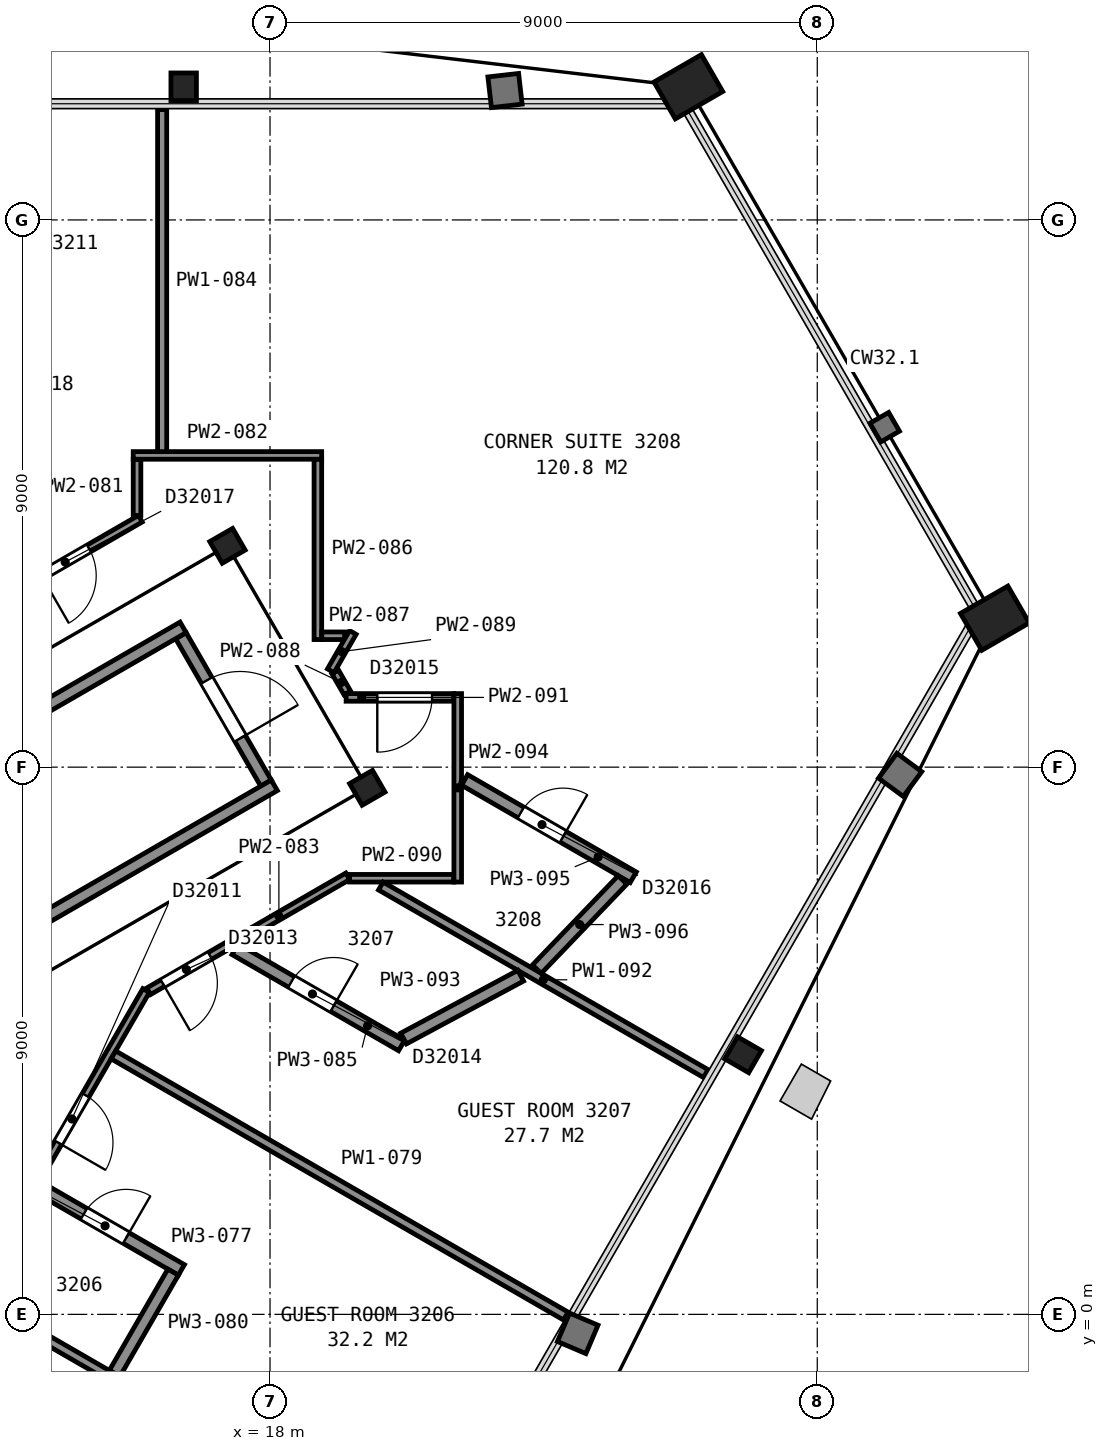
"""IFC4 building model, lengths in metres.
Left out: names, types, materials, properties, quantities, classifications, styles, units other than length and angle.
Written with IfcOpenShell. Run it as: python <this file> out.ifc"""

import sys

from ifc_helpers import new_model, si_unit, direction, frame, frame_2d, origin, origin_2d, place, context, subcontext, project, spatial, rectangle, hollow_rectangle, i_section, extrude, element, fill, save


model = new_model("IFC4")
c1 = context("Model", 3, precision=1e-05, world=origin(), true_north=direction((0.0, 1.0)))
c2 = subcontext(c1, "Body", "Model", "MODEL_VIEW")
j1 = project(units=[si_unit("LENGTHUNIT", "METRE"), si_unit("PLANEANGLEUNIT", "RADIAN")], contexts=[c1])
p1 = place(None, origin())
s1 = spatial("IfcSite", under=j1, at=p1, CompositionType="ELEMENT")
p2 = place(p1, origin())
s2 = spatial("IfcBuilding", under=s1, at=p2, CompositionType="ELEMENT")
p3 = place(p2, frame((0.0, 0.0, 132.4)))
s3 = spatial("IfcBuildingStorey", under=s2, at=p3, CompositionType="ELEMENT", Elevation=132.4)
p4 = place(p3, frame((24.88, 20.19, 0.075), z_axis=(0.0, 0.0, 1.0), x_axis=(0.5, -0.866025403784, 0.0)))
e1 = element("IfcColumn", 1, at=p4, inside=s3, PredefinedType="COLUMN", context=c2, shape_type="SweptSolid", body=[
    extrude(hollow_rectangle(XDim=0.7, YDim=0.9, WallThickness=0.065, at=origin_2d()), origin(), (0.0, 0.0, 1.0), 3.525),
])
for number, where, z_axis, x_axis in (
    (2, (16.58, 20.19, 0.04), (0.0, 0.0, 1.0), (1.0, 0.0, 0.0)),
    (3, (25.78, 4.27, 0.04), (0.0, 0.0, 1.0), (-0.5, -0.866, 0.0)),
):
    element("IfcColumn", number, at=place(p3, frame(where, z_axis=z_axis, x_axis=x_axis)), inside=s3, PredefinedType="COLUMN", context=c2, shape_type="SweptSolid", body=[
        extrude(i_section(OverallWidth=0.419, OverallDepth=0.455, WebThickness=0.042, FlangeThickness=0.068, FilletRadius=0.015, at=origin_2d()), origin(), (0.0, 0.0, 1.0), 3.56),
    ])
p5 = place(p3, frame((29.92, 11.45, 0.075), z_axis=(0.0, 0.0, 1.0), x_axis=(0.5, -0.866025403784, 0.0)))
e4 = element("IfcColumn", 4, at=p5, inside=s3, PredefinedType="COLUMN", context=c2, shape_type="SweptSolid", body=[
    extrude(hollow_rectangle(XDim=0.7, YDim=0.9, WallThickness=0.065, at=origin_2d()), origin(), (0.0, 0.0, 1.0), 3.525),
])
for number, where, z_axis, x_axis in (
    (5, (19.6, 8.66, 0.0), (0.0, 0.0, 1.0), (0.5, -0.866, 0.0)),
    (6, (17.3, 12.64, 0.0), (0.0, 0.0, 1.0), (0.5, -0.866, 0.0)),
):
    element("IfcColumn", number, at=place(p3, frame(where, z_axis=z_axis, x_axis=x_axis)), inside=s3, PredefinedType="COLUMN", context=c2, shape_type="SweptSolid", body=[
        extrude(i_section(OverallWidth=0.411, OverallDepth=0.434, WebThickness=0.036, FlangeThickness=0.057, FilletRadius=0.015, at=origin_2d()), origin(), (0.0, 0.0, 1.0), 3.6),
    ])
p6 = place(p3, frame((17.934, 8.738, 0.0), z_axis=(0.0, 0.0, 1.0), x_axis=(-0.49998411664, 0.866034573852, 0.0)))
e7 = element("IfcWall", 7, at=p6, inside=s3, PredefinedType="PARTITIONING", context=c2, shape_type="SweptSolid", body=[
    extrude(rectangle(XDim=2.8, YDim=0.2, at=frame_2d((1.4, 0.0))), origin(), (0.0, 0.0, 1.0), 3.35),
])
p7 = place(p6, frame((0.85, 0.0, 0.0)))
e8 = element("IfcOpeningElement", 8, at=p7, cuts=e7, PredefinedType="OPENING", context=c2, shape_type="SweptSolid", body=[
    extrude(rectangle(XDim=1.1, YDim=2.1, at=frame_2d((0.55, 1.05))), frame((0.0, 0.11, 0.0), z_axis=(0.0, -1.0, 0.0), x_axis=(1.0, 0.0, 0.0)), (0.0, 0.0, 1.0), 0.22),
])
for number, where, z_axis, x_axis in (
    (9, (6.178, 5.299, 0.0), (0.0, 0.0, 1.0), (0.866, 0.5, 0.0)),
    (10, (7.678, 2.701, 0.0), (0.0, 0.0, 1.0), (0.866, 0.5, 0.0)),
):
    element("IfcWall", number, at=place(p3, frame(where, z_axis=z_axis, x_axis=x_axis)), inside=s3, PredefinedType="PARTITIONING", context=c2, shape_type="SweptSolid", body=[
        extrude(rectangle(XDim=12.0, YDim=0.2, at=frame_2d((6.0, 0.0))), origin(), (0.0, 0.0, 1.0), 3.35),
    ])
p8 = place(p3, frame((15.962, 5.326, 0.0), z_axis=(0.0, 0.0, 1.0), x_axis=(-0.499992829944, -0.866029543379, 0.0)))
e11 = element("IfcWall", 11, at=p8, inside=s3, PredefinedType="PARTITIONING", context=c2, shape_type="SweptSolid", body=[
    extrude(rectangle(XDim=24.413, YDim=0.125, at=frame_2d((12.207, 0.0))), origin(), (0.0, 0.0, 1.0), 2.613),
])
p9 = place(p8, frame((21.258, 0.0, 0.0)))
e12 = element("IfcOpeningElement", 12, at=p9, cuts=e11, PredefinedType="OPENING", context=c2, shape_type="SweptSolid", body=[
    extrude(rectangle(XDim=0.9, YDim=2.1, at=frame_2d((0.45, 1.05))), frame((0.0, 0.073, 0.0), z_axis=(0.0, -1.0, 0.0), x_axis=(1.0, 0.0, 0.0)), (0.0, 0.0, 1.0), 0.145),
])
p10 = place(p8, frame((18.502, 0.0, 0.0)))
e13 = element("IfcOpeningElement", 13, at=p10, cuts=e11, PredefinedType="OPENING", context=c2, shape_type="SweptSolid", body=[
    extrude(rectangle(XDim=0.9, YDim=2.1, at=frame_2d((0.45, 1.05))), frame((0.0, 0.073, 0.0), z_axis=(0.0, -1.0, 0.0), x_axis=(1.0, 0.0, 0.0)), (0.0, 0.0, 1.0), 0.145),
])
p11 = place(p8, frame((11.799, 0.0, 0.0)))
e14 = element("IfcOpeningElement", 14, at=p11, cuts=e11, PredefinedType="OPENING", context=c2, shape_type="SweptSolid", body=[
    extrude(rectangle(XDim=0.9, YDim=2.1, at=frame_2d((0.45, 1.05))), frame((0.0, 0.073, 0.0), z_axis=(0.0, -1.0, 0.0), x_axis=(1.0, 0.0, 0.0)), (0.0, 0.0, 1.0), 0.145),
])
p12 = place(p8, frame((9.043, 0.0, 0.0)))
e15 = element("IfcOpeningElement", 15, at=p12, cuts=e11, PredefinedType="OPENING", context=c2, shape_type="SweptSolid", body=[
    extrude(rectangle(XDim=0.9, YDim=2.1, at=frame_2d((0.45, 1.05))), frame((0.0, 0.073, 0.0), z_axis=(0.0, -1.0, 0.0), x_axis=(1.0, 0.0, 0.0)), (0.0, 0.0, 1.0), 0.145),
])
p13 = place(p8, frame((1.99, 0.0, 0.0)))
e16 = element("IfcOpeningElement", 16, at=p13, cuts=e11, PredefinedType="OPENING", context=c2, shape_type="SweptSolid", body=[
    extrude(rectangle(XDim=0.9, YDim=2.1, at=frame_2d((0.45, 1.05))), frame((0.0, 0.073, 0.0), z_axis=(0.0, -1.0, 0.0), x_axis=(1.0, 0.0, 0.0)), (0.0, 0.0, 1.0), 0.145),
])
p14 = place(p3, frame((12.605, 11.203, 0.0), z_axis=(0.0, 0.0, 1.0), x_axis=(0.866113281362, 0.499847760672, 0.0)))
e17 = element("IfcWall", 17, at=p14, inside=s3, PredefinedType="PARTITIONING", context=c2, shape_type="SweptSolid", body=[
    extrude(rectangle(XDim=3.767, YDim=0.125, at=frame_2d((1.883, 0.0))), origin(), (0.0, 0.0, 1.0), 2.613),
])
p15 = place(p14, frame((1.89, 0.0, 0.0)))
e18 = element("IfcOpeningElement", 18, at=p15, cuts=e17, PredefinedType="OPENING", context=c2, shape_type="SweptSolid", body=[
    extrude(rectangle(XDim=0.9, YDim=2.1, at=frame_2d((0.45, 1.05))), frame((0.0, 0.073, 0.0), z_axis=(0.0, -1.0, 0.0), x_axis=(1.0, 0.0, 0.0)), (0.0, 0.0, 1.0), 0.145),
])
p16 = place(p3, frame((13.122, 0.281, 0.0), z_axis=(0.0, 0.0, 1.0), x_axis=(0.866029425019, -0.499993034952, 0.0)))
e19 = element("IfcWall", 19, at=p16, inside=s3, PredefinedType="PARTITIONING", context=c2, shape_type="SweptSolid", body=[
    extrude(rectangle(XDim=8.591, YDim=0.15, at=frame_2d((4.296, 0.0))), origin(), (0.0, 0.0, 1.0), 2.613),
])
p17 = place(p3, frame((16.542, 0.731, 0.0), z_axis=(0.0, 0.0, 1.0), x_axis=(-0.86596722502, 0.50010075504, 0.0)))
e20 = element("IfcWall", 20, at=p17, inside=s3, PredefinedType="PARTITIONING", context=c2, shape_type="SweptSolid", body=[
    extrude(rectangle(XDim=2.737, YDim=0.2, at=frame_2d((1.369, 0.0))), origin(), (0.0, 0.0, 1.0), 2.613),
])
p18 = place(p17, frame((1.05, 0.0, 0.0)))
e21 = element("IfcOpeningElement", 21, at=p18, cuts=e20, PredefinedType="OPENING", context=c2, shape_type="SweptSolid", body=[
    extrude(rectangle(XDim=0.8, YDim=2.1, at=frame_2d((0.4, 1.05))), frame((0.0, 0.11, 0.0), z_axis=(0.0, -1.0, 0.0), x_axis=(1.0, 0.0, 0.0)), (0.0, 0.0, 1.0), 0.22),
])
p19 = place(p3, frame((15.424, 4.268, 0.0), z_axis=(0.0, 0.0, 1.0), x_axis=(0.866022320763, -0.500005339912, 0.0)))
e22 = element("IfcWall", 22, at=p19, inside=s3, PredefinedType="PARTITIONING", context=c2, shape_type="SweptSolid", body=[
    extrude(rectangle(XDim=8.591, YDim=0.15, at=frame_2d((4.296, 0.0))), origin(), (0.0, 0.0, 1.0), 2.613),
])
p20 = place(p3, frame((15.446, -0.969, 0.0), z_axis=(0.0, 0.0, 1.0), x_axis=(0.499913221443, 0.866075499611, 0.0)))
e23 = element("IfcWall", 23, at=p20, inside=s3, PredefinedType="PARTITIONING", context=c2, shape_type="SweptSolid", body=[
    extrude(rectangle(XDim=1.92, YDim=0.2, at=frame_2d((0.96, 0.0))), origin(), (0.0, 0.0, 1.0), 2.613),
])
p21 = place(p3, frame((15.813, 13.14, 0.0), z_axis=(0.0, 0.0, 1.0), x_axis=(0.0, 1.0, 0.0)))
e24 = element("IfcWall", 24, at=p21, inside=s3, PredefinedType="PARTITIONING", context=c2, shape_type="SweptSolid", body=[
    extrude(rectangle(XDim=0.922, YDim=0.125, at=frame_2d((0.461, 0.0))), origin(), (0.0, 0.0, 1.0), 2.613),
])
p22 = place(p3, frame((15.75, 14.127, 0.0), z_axis=(0.0, 0.0, 1.0), x_axis=(1.0, 0.0, 0.0)))
e25 = element("IfcWall", 25, at=p22, inside=s3, PredefinedType="PARTITIONING", context=c2, shape_type="SweptSolid", body=[
    extrude(rectangle(XDim=3.099, YDim=0.125, at=frame_2d((1.55, 0.0))), origin(), (0.0, 0.0, 1.0), 2.613),
])
p23 = place(p3, frame((19.278, 7.204, 0.0), z_axis=(0.0, 0.0, 1.0), x_axis=(-0.866028547684, -0.499994554566, 0.0)))
e26 = element("IfcWall", 26, at=p23, inside=s3, PredefinedType="PARTITIONING", context=c2, shape_type="SweptSolid", body=[
    extrude(rectangle(XDim=3.78, YDim=0.125, at=frame_2d((1.89, 0.0))), origin(), (0.0, 0.0, 1.0), 2.613),
])
p24 = place(p23, frame((2.615, 0.0, 0.0)))
e27 = element("IfcOpeningElement", 27, at=p24, cuts=e26, PredefinedType="OPENING", context=c2, shape_type="SweptSolid", body=[
    extrude(rectangle(XDim=0.9, YDim=2.1, at=frame_2d((0.45, 1.05))), frame((0.0, 0.073, 0.0), z_axis=(0.0, -1.0, 0.0), x_axis=(1.0, 0.0, 0.0)), (0.0, 0.0, 1.0), 0.145),
])
p25 = place(p3, frame((16.226, 14.189, 0.0), z_axis=(0.0, 0.0, 1.0), x_axis=(0.0, 1.0, 0.0)))
e28 = element("IfcWall", 28, at=p25, inside=s3, PredefinedType="PARTITIONING", context=c2, shape_type="SweptSolid", body=[
    extrude(rectangle(XDim=5.625, YDim=0.15, at=frame_2d((2.813, 0.0))), origin(), (0.0, 0.0, 1.0), 2.613),
])
p26 = place(p3, frame((17.425, 6.004, 0.0), z_axis=(0.0, 0.0, 1.0), x_axis=(0.866145753309, -0.499791490549, 0.0)))
e29 = element("IfcWall", 29, at=p26, inside=s3, PredefinedType="PARTITIONING", context=c2, shape_type="SweptSolid", body=[
    extrude(rectangle(XDim=3.163, YDim=0.2, at=frame_2d((1.582, 0.0))), origin(), (0.0, 0.0, 1.0), 2.613),
])
p27 = place(p26, frame((1.07, 0.0, 0.0)))
e30 = element("IfcOpeningElement", 30, at=p27, cuts=e29, PredefinedType="OPENING", context=c2, shape_type="SweptSolid", body=[
    extrude(rectangle(XDim=0.8, YDim=2.1, at=frame_2d((0.4, 1.05))), frame((0.0, 0.11, 0.0), z_axis=(0.0, -1.0, 0.0), x_axis=(1.0, 0.0, 0.0)), (0.0, 0.0, 1.0), 0.22),
])
p28 = place(p3, frame((18.787, 11.098, 0.0), z_axis=(0.0, 0.0, 1.0), x_axis=(0.0, 1.0, 0.0)))
e31 = element("IfcWall", 31, at=p28, inside=s3, PredefinedType="PARTITIONING", context=c2, shape_type="SweptSolid", body=[
    extrude(rectangle(XDim=2.964, YDim=0.125, at=frame_2d((1.482, 0.0))), origin(), (0.0, 0.0, 1.0), 2.613),
])
p29 = place(p3, frame((18.852, 11.161, 0.0), z_axis=(0.0, 0.0, 1.0), x_axis=(1.0, 0.0, 0.0)))
e32 = element("IfcWall", 32, at=p29, inside=s3, PredefinedType="PARTITIONING", context=c2, shape_type="SweptSolid", body=[
    extrude(rectangle(XDim=0.374, YDim=0.125, at=frame_2d((0.187, 0.0))), origin(), (0.0, 0.0, 1.0), 2.613),
])
p30 = place(p3, frame((19.073, 10.565, 0.0), z_axis=(0.0, 0.0, 1.0), x_axis=(0.499899443193, -0.866083452501, 0.0)))
e33 = element("IfcWall", 33, at=p30, inside=s3, PredefinedType="PARTITIONING", context=c2, shape_type="SweptSolid", body=[
    extrude(rectangle(XDim=0.398, YDim=0.125, at=frame_2d((0.199, 0.0))), origin(), (0.0, 0.0, 1.0), 2.613),
])
p31 = place(p3, frame((18.999, 10.585, 0.0), z_axis=(0.0, 0.0, 1.0), x_axis=(0.499712769023, 0.866191173169, 0.0)))
e34 = element("IfcWall", 34, at=p31, inside=s3, PredefinedType="PARTITIONING", context=c2, shape_type="SweptSolid", body=[
    extrude(rectangle(XDim=0.728, YDim=0.125, at=frame_2d((0.364, 0.0))), origin(), (0.0, 0.0, 1.0), 2.613),
])
p32 = place(p3, frame((19.309, 7.173, 0.0), z_axis=(0.0, 0.0, 1.0), x_axis=(1.0, 0.0, 0.0)))
e35 = element("IfcWall", 35, at=p32, inside=s3, PredefinedType="PARTITIONING", context=c2, shape_type="SweptSolid", body=[
    extrude(rectangle(XDim=1.713, YDim=0.125, at=frame_2d((0.856, 0.0))), origin(), (0.0, 0.0, 1.0), 2.613),
])
p33 = place(p3, frame((19.251, 10.147, 0.0), z_axis=(0.0, 0.0, 1.0), x_axis=(1.0, 0.0, 0.0)))
e36 = element("IfcWall", 36, at=p33, inside=s3, PredefinedType="PARTITIONING", context=c2, shape_type="SweptSolid", body=[
    extrude(rectangle(XDim=1.771, YDim=0.125, at=frame_2d((0.885, 0.0))), origin(), (0.0, 0.0, 1.0), 2.613),
])
p34 = place(p33, frame((0.512, 0.0, 0.0)))
e37 = element("IfcOpeningElement", 37, at=p34, cuts=e36, PredefinedType="OPENING", context=c2, shape_type="SweptSolid", body=[
    extrude(rectangle(XDim=0.9, YDim=2.1, at=frame_2d((0.45, 1.05))), frame((0.0, 0.073, 0.0), z_axis=(0.0, -1.0, 0.0), x_axis=(1.0, 0.0, 0.0)), (0.0, 0.0, 1.0), 0.145),
])
p35 = place(p3, frame((19.822, 7.046, 0.0), z_axis=(0.0, 0.0, 1.0), x_axis=(0.866041323853, -0.499972424619, 0.0)))
e38 = element("IfcWall", 38, at=p35, inside=s3, PredefinedType="PARTITIONING", context=c2, shape_type="SweptSolid", body=[
    extrude(rectangle(XDim=6.172, YDim=0.15, at=frame_2d((3.086, 0.0))), origin(), (0.0, 0.0, 1.0), 2.613),
])
p36 = place(p3, frame((20.197, 4.537, 0.0), z_axis=(0.0, 0.0, 1.0), x_axis=(0.881162538645, 0.472813473253, 0.0)))
e39 = element("IfcWall", 39, at=p36, inside=s3, PredefinedType="PARTITIONING", context=c2, shape_type="SweptSolid", body=[
    extrude(rectangle(XDim=2.185, YDim=0.2, at=frame_2d((1.093, 0.0))), origin(), (0.0, 0.0, 1.0), 2.613),
])
p37 = place(p3, frame((21.087, 7.111, 0.0), z_axis=(0.0, 0.0, 1.0), x_axis=(0.0, 1.0, 0.0)))
e40 = element("IfcWall", 40, at=p37, inside=s3, PredefinedType="PARTITIONING", context=c2, shape_type="SweptSolid", body=[
    extrude(rectangle(XDim=3.099, YDim=0.125, at=frame_2d((1.549, 0.0))), origin(), (0.0, 0.0, 1.0), 2.613),
])
p38 = place(p3, frame((23.974, 7.189, 0.0), z_axis=(0.0, 0.0, 1.0), x_axis=(-0.866105631149, 0.499861016376, 0.0)))
e41 = element("IfcWall", 41, at=p38, inside=s3, PredefinedType="PARTITIONING", context=c2, shape_type="SweptSolid", body=[
    extrude(rectangle(XDim=3.203, YDim=0.2, at=frame_2d((1.602, 0.0))), origin(), (0.0, 0.0, 1.0), 2.613),
])
p39 = place(p38, frame((1.333, 0.0, 0.0)))
e42 = element("IfcOpeningElement", 42, at=p39, cuts=e41, PredefinedType="OPENING", context=c2, shape_type="SweptSolid", body=[
    extrude(rectangle(XDim=0.8, YDim=2.1, at=frame_2d((0.4, 1.05))), frame((0.0, 0.11, 0.0), z_axis=(0.0, -1.0, 0.0), x_axis=(1.0, 0.0, 0.0)), (0.0, 0.0, 1.0), 0.22),
])
p40 = place(p3, frame((22.388, 5.677, 0.0), z_axis=(0.0, 0.0, 1.0), x_axis=(0.692374421384, 0.721538398572, 0.0)))
e43 = element("IfcWall", 43, at=p40, inside=s3, PredefinedType="PARTITIONING", context=c2, shape_type="SweptSolid", body=[
    extrude(rectangle(XDim=2.034, YDim=0.2, at=frame_2d((1.017, 0.0))), origin(), (0.0, 0.0, 1.0), 2.613),
])
p41 = place(p7, origin())
e44 = element("IfcDoor", 44, at=p41, inside=s3, OperationType="SINGLE_SWING_LEFT", PredefinedType="DOOR", context=c2, shape_type="SweptSolid", body=[
    extrude(rectangle(XDim=1.1, YDim=2.1, at=frame_2d((0.55, 1.05))), frame((0.0, 0.025, 0.0), z_axis=(0.0, -1.0, 0.0), x_axis=(1.0, 0.0, 0.0)), (0.0, 0.0, 1.0), 0.05),
])
fill(e8, e44)
p42 = place(p13, origin())
e45 = element("IfcDoor", 45, at=p42, inside=s3, OperationType="SINGLE_SWING_RIGHT", PredefinedType="DOOR", context=c2, shape_type="SweptSolid", body=[
    extrude(rectangle(XDim=0.9, YDim=2.1, at=frame_2d((0.45, 1.05))), frame((0.0, 0.025, 0.0), z_axis=(0.0, -1.0, 0.0), x_axis=(1.0, 0.0, 0.0)), (0.0, 0.0, 1.0), 0.05),
])
fill(e16, e45)
p43 = place(p15, origin())
e46 = element("IfcDoor", 46, at=p43, inside=s3, OperationType="SINGLE_SWING_LEFT", PredefinedType="DOOR", context=c2, shape_type="SweptSolid", body=[
    extrude(rectangle(XDim=0.9, YDim=2.1, at=frame_2d((0.45, 1.05))), frame((0.0, 0.025, 0.0), z_axis=(0.0, -1.0, 0.0), x_axis=(1.0, 0.0, 0.0)), (0.0, 0.0, 1.0), 0.05),
])
fill(e18, e46)
p44 = place(p18, origin())
e47 = element("IfcDoor", 47, at=p44, inside=s3, OperationType="SINGLE_SWING_LEFT", PredefinedType="DOOR", context=c2, shape_type="SweptSolid", body=[
    extrude(rectangle(XDim=0.8, YDim=2.1, at=frame_2d((0.4, 1.05))), frame((0.0, 0.025, 0.0), z_axis=(0.0, -1.0, 0.0), x_axis=(1.0, 0.0, 0.0)), (0.0, 0.0, 1.0), 0.05),
])
fill(e21, e47)
p45 = place(p24, origin())
e48 = element("IfcDoor", 48, at=p45, inside=s3, OperationType="SINGLE_SWING_RIGHT", PredefinedType="DOOR", context=c2, shape_type="SweptSolid", body=[
    extrude(rectangle(XDim=0.9, YDim=2.1, at=frame_2d((0.45, 1.05))), frame((0.0, 0.025, 0.0), z_axis=(0.0, -1.0, 0.0), x_axis=(1.0, 0.0, 0.0)), (0.0, 0.0, 1.0), 0.05),
])
fill(e27, e48)
p46 = place(p27, origin())
e49 = element("IfcDoor", 49, at=p46, inside=s3, OperationType="SINGLE_SWING_RIGHT", PredefinedType="DOOR", context=c2, shape_type="SweptSolid", body=[
    extrude(rectangle(XDim=0.8, YDim=2.1, at=frame_2d((0.4, 1.05))), frame((0.0, 0.025, 0.0), z_axis=(0.0, -1.0, 0.0), x_axis=(1.0, 0.0, 0.0)), (0.0, 0.0, 1.0), 0.05),
])
fill(e30, e49)
p47 = place(p34, origin())
e50 = element("IfcDoor", 50, at=p47, inside=s3, OperationType="SINGLE_SWING_LEFT", PredefinedType="DOOR", context=c2, shape_type="SweptSolid", body=[
    extrude(rectangle(XDim=0.9, YDim=2.1, at=frame_2d((0.45, 1.05))), frame((0.0, 0.025, 0.0), z_axis=(0.0, -1.0, 0.0), x_axis=(1.0, 0.0, 0.0)), (0.0, 0.0, 1.0), 0.05),
])
fill(e37, e50)
p48 = place(p39, origin())
e51 = element("IfcDoor", 51, at=p48, inside=s3, OperationType="SINGLE_SWING_LEFT", PredefinedType="DOOR", context=c2, shape_type="SweptSolid", body=[
    extrude(rectangle(XDim=0.8, YDim=2.1, at=frame_2d((0.4, 1.05))), frame((0.0, 0.025, 0.0), z_axis=(0.0, -1.0, 0.0), x_axis=(1.0, 0.0, 0.0)), (0.0, 0.0, 1.0), 0.05),
])
fill(e42, e51)
save(model, sys.argv[1])
